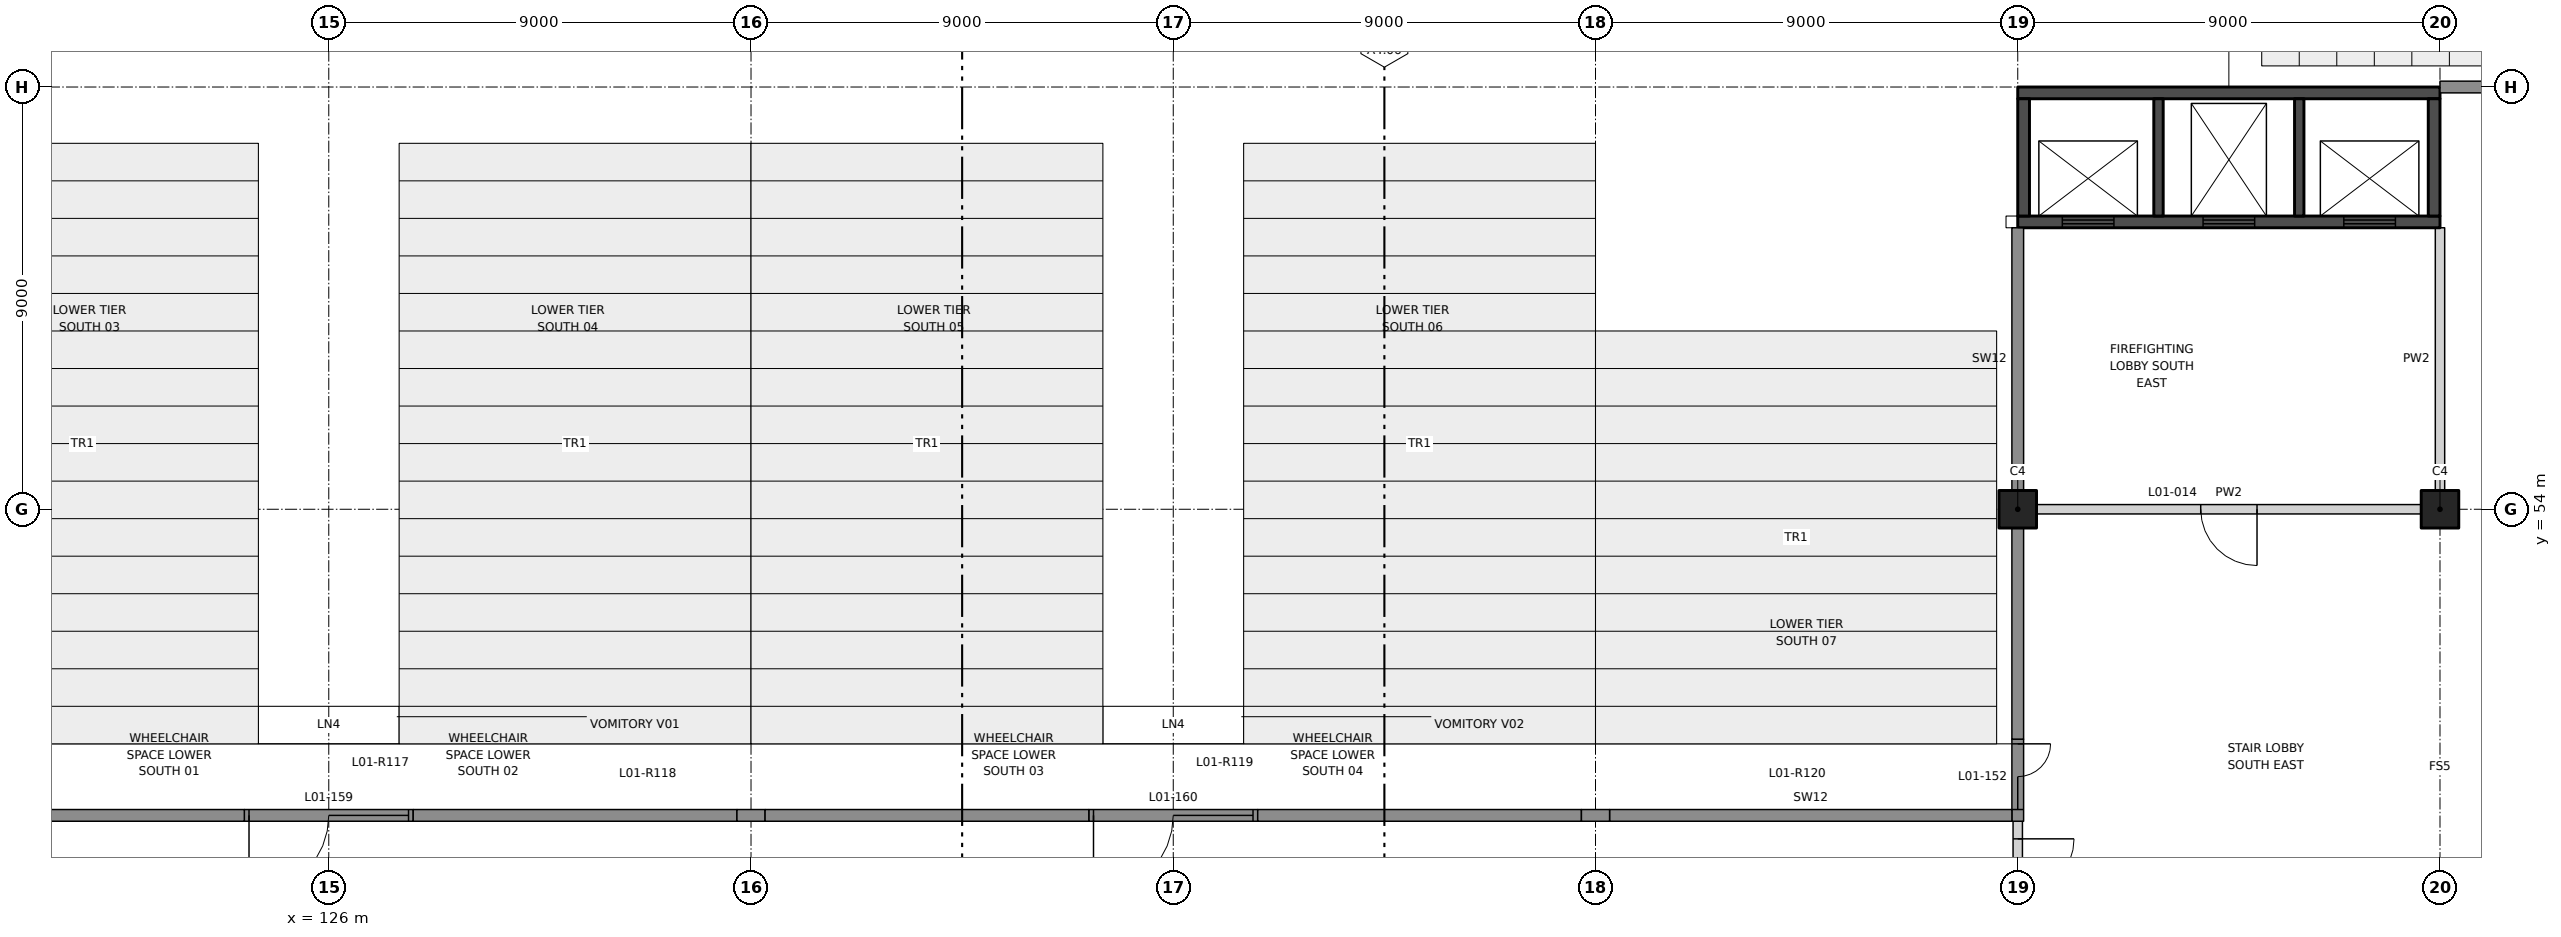
"""IFC4 building model, lengths in metres.
Left out: names, types, materials, properties, quantities, classifications, styles, units other than length and angle.
Written with IfcOpenShell. Run it as: python <this file> out.ifc"""

import sys

from ifc_helpers import new_model, si_unit, direction, frame, frame_2d, origin, origin_2d, place, context, subcontext, project, spatial, rectangle, extrude, element, fill, save


model = new_model("IFC4")
c1 = context("Model", 3, precision=1e-05, world=origin(), true_north=direction((0.0, 1.0)))
c2 = subcontext(c1, "Body", "Model", "MODEL_VIEW")
j1 = project(units=[si_unit("LENGTHUNIT", "METRE"), si_unit("PLANEANGLEUNIT", "RADIAN")], contexts=[c1])
p1 = place(None, origin())
s1 = spatial("IfcSite", under=j1, at=p1, CompositionType="ELEMENT")
p2 = place(p1, origin())
s2 = spatial("IfcBuilding", under=s1, at=p2, CompositionType="ELEMENT")
p3 = place(p2, frame((0.0, 0.0, 7.0)))
s3 = spatial("IfcBuildingStorey", under=s2, at=p3, CompositionType="ELEMENT", Elevation=7.0)
for number, where, z_axis, x_axis in (
    (1, (162.0, 54.0, 0.0), (0.0, 0.0, 1.0), (1.0, 0.0, 0.0)),
    (2, (171.0, 54.0, 0.0), (0.0, 0.0, 1.0), (1.0, 0.0, 0.0)),
):
    element("IfcColumn", number, at=place(p3, frame(where, z_axis=z_axis, x_axis=x_axis)), inside=s3, PredefinedType="COLUMN", context=c2, shape_type="SweptSolid", body=[
        extrude(rectangle(XDim=0.8, YDim=0.8, at=origin_2d()), origin(), (0.0, 0.0, 1.0), 4.5),
    ])
p4 = place(p3, frame((162.4, 54.0, 0.0), z_axis=(0.0, 0.0, 1.0), x_axis=(1.0, 0.0, 0.0)))
e3 = element("IfcWall", 3, at=p4, inside=s3, PredefinedType="PARTITIONING", context=c2, shape_type="SweptSolid", body=[
    extrude(rectangle(XDim=8.2, YDim=0.2, at=frame_2d((4.1, 0.0))), origin(), (0.0, 0.0, 1.0), 3.25),
])
p5 = place(p4, frame((3.5, 0.0, 0.0)))
e4 = element("IfcOpeningElement", 4, at=p5, cuts=e3, PredefinedType="OPENING", context=c2, shape_type="SweptSolid", body=[
    extrude(rectangle(XDim=1.2, YDim=2.1, at=frame_2d((0.6, 1.05))), frame((0.0, 0.11, 0.0), z_axis=(0.0, -1.0, 0.0), x_axis=(1.0, 0.0, 0.0)), (0.0, 0.0, 1.0), 0.22),
])
p6 = place(p3, frame((162.0, 45.4, 0.0), z_axis=(0.0, 0.0, 1.0), x_axis=(0.0, 1.0, 0.0)))
e5 = element("IfcWall", 5, at=p6, inside=s3, PredefinedType="PARTITIONING", context=c2, shape_type="SweptSolid", body=[
    extrude(rectangle(XDim=1.95, YDim=0.2, at=frame_2d((0.975, 0.0))), origin(), (0.0, 0.0, 1.0), 3.15),
])
p7 = place(p6, frame((0.375, 0.0, 0.0)))
e6 = element("IfcOpeningElement", 6, at=p7, cuts=e5, PredefinedType="OPENING", context=c2, shape_type="SweptSolid", body=[
    extrude(rectangle(XDim=1.2, YDim=2.1, at=frame_2d((0.6, 1.05))), frame((0.0, 0.11, 0.0), z_axis=(0.0, -1.0, 0.0), x_axis=(1.0, 0.0, 0.0)), (0.0, 0.0, 1.0), 0.22),
])
p8 = place(p3, frame((171.0, 54.4, 0.0), z_axis=(0.0, 0.0, 1.0), x_axis=(0.0, 1.0, 0.0)))
e7 = element("IfcWall", 7, at=p8, inside=s3, PredefinedType="PARTITIONING", context=c2, shape_type="SweptSolid", body=[
    extrude(rectangle(XDim=5.6, YDim=0.2, at=frame_2d((2.8, 0.0))), origin(), (0.0, 0.0, 1.0), 3.45),
])
p9 = place(p3, frame((162.0, 60.125, 0.0), z_axis=(0.0, 0.0, 1.0), x_axis=(1.0, 0.0, 0.0)))
e8 = element("IfcWall", 8, at=p9, inside=s3, PredefinedType="SHEAR", context=c2, shape_type="SweptSolid", body=[
    extrude(rectangle(XDim=9.0, YDim=0.25, at=frame_2d((4.5, 0.0))), origin(), (0.0, 0.0, 1.0), 4.5),
])
p10 = place(p9, frame((0.95, 0.0, 0.0)))
e9 = element("IfcOpeningElement", 9, at=p10, cuts=e8, PredefinedType="OPENING", context=c2, shape_type="SweptSolid", body=[
    extrude(rectangle(XDim=1.1, YDim=2.1, at=frame_2d((0.55, 1.05))), frame((0.0, 0.135, 0.0), z_axis=(0.0, -1.0, 0.0), x_axis=(1.0, 0.0, 0.0)), (0.0, 0.0, 1.0), 0.27),
])
p11 = place(p9, frame((3.95, 0.0, 0.0)))
e10 = element("IfcOpeningElement", 10, at=p11, cuts=e8, PredefinedType="OPENING", context=c2, shape_type="SweptSolid", body=[
    extrude(rectangle(XDim=1.1, YDim=2.1, at=frame_2d((0.55, 1.05))), frame((0.0, 0.135, 0.0), z_axis=(0.0, -1.0, 0.0), x_axis=(1.0, 0.0, 0.0)), (0.0, 0.0, 1.0), 0.27),
])
p12 = place(p9, frame((6.95, 0.0, 0.0)))
e11 = element("IfcOpeningElement", 11, at=p12, cuts=e8, PredefinedType="OPENING", context=c2, shape_type="SweptSolid", body=[
    extrude(rectangle(XDim=1.1, YDim=2.1, at=frame_2d((0.55, 1.05))), frame((0.0, 0.135, 0.0), z_axis=(0.0, -1.0, 0.0), x_axis=(1.0, 0.0, 0.0)), (0.0, 0.0, 1.0), 0.27),
])
p13 = place(p3, frame((162.0, 62.875, 0.0), z_axis=(0.0, 0.0, 1.0), x_axis=(1.0, 0.0, 0.0)))
e12 = element("IfcWall", 12, at=p13, inside=s3, PredefinedType="SHEAR", context=c2, shape_type="SweptSolid", body=[
    extrude(rectangle(XDim=9.0, YDim=0.25, at=frame_2d((4.5, 0.0))), origin(), (0.0, 0.0, 1.0), 4.5),
])
for number, where, z_axis, x_axis in (
    (13, (162.125, 60.25, 0.0), (0.0, 0.0, 1.0), (0.0, 1.0, 0.0)),
    (14, (170.875, 60.25, 0.0), (0.0, 0.0, 1.0), (0.0, 1.0, 0.0)),
):
    element("IfcWall", number, at=place(p3, frame(where, z_axis=z_axis, x_axis=x_axis)), inside=s3, PredefinedType="SHEAR", context=c2, shape_type="SweptSolid", body=[
        extrude(rectangle(XDim=2.5, YDim=0.25, at=frame_2d((1.25, 0.0))), origin(), (0.0, 0.0, 1.0), 4.5),
    ])
for number, where, z_axis, x_axis in (
    (15, (165.0, 60.25, 0.0), (0.0, 0.0, 1.0), (0.0, 1.0, 0.0)),
    (16, (168.0, 60.25, 0.0), (0.0, 0.0, 1.0), (0.0, 1.0, 0.0)),
):
    element("IfcWall", number, at=place(p3, frame(where, z_axis=z_axis, x_axis=x_axis)), inside=s3, PredefinedType="SHEAR", context=c2, shape_type="SweptSolid", body=[
        extrude(rectangle(XDim=2.5, YDim=0.2, at=frame_2d((1.25, 0.0))), origin(), (0.0, 0.0, 1.0), 4.5),
    ])
p14 = place(p3, frame((162.0, 49.1, 0.0), z_axis=(0.0, 0.0, 1.0), x_axis=(0.0, -1.0, 0.0)))
e17 = element("IfcWall", 17, at=p14, inside=s3, PredefinedType="SOLIDWALL", context=c2, shape_type="SweptSolid", body=[
    extrude(rectangle(XDim=1.75, YDim=0.25, at=frame_2d((0.875, 0.0))), origin(), (0.0, 0.0, 1.0), 3.15),
])
p15 = place(p14, frame((0.1, 0.0, 0.0)))
e18 = element("IfcOpeningElement", 18, at=p15, cuts=e17, PredefinedType="OPENING", context=c2, shape_type="SweptSolid", body=[
    extrude(rectangle(XDim=1.4, YDim=2.4, at=frame_2d((0.7, 1.2))), frame((0.0, 0.135, 0.0), z_axis=(0.0, -1.0, 0.0), x_axis=(1.0, 0.0, 0.0)), (0.0, 0.0, 1.0), 0.27),
])
p16 = place(p3, frame((162.0, 49.1, 0.0), z_axis=(0.0, 0.0, 1.0), x_axis=(0.0, 1.0, 0.0)))
e19 = element("IfcWall", 19, at=p16, inside=s3, PredefinedType="SOLIDWALL", context=c2, shape_type="SweptSolid", body=[
    extrude(rectangle(XDim=4.5, YDim=0.25, at=frame_2d((2.25, 0.0))), origin(), (0.0, 0.0, 1.0), 3.15),
])
p17 = place(p3, frame((162.0, 54.4, 0.0), z_axis=(0.0, 0.0, 1.0), x_axis=(0.0, 1.0, 0.0)))
e20 = element("IfcWall", 20, at=p17, inside=s3, PredefinedType="SOLIDWALL", context=c2, shape_type="SweptSolid", body=[
    extrude(rectangle(XDim=5.6, YDim=0.25, at=frame_2d((2.8, 0.0))), origin(), (0.0, 0.0, 1.0), 3.45),
])
p18 = place(p3, frame((171.0, 63.0, 0.0), z_axis=(0.0, 0.0, 1.0), x_axis=(1.0, 0.0, 0.0)))
e21 = element("IfcWall", 21, at=p18, inside=s3, PredefinedType="SOLIDWALL", context=c2, shape_type="SweptSolid", body=[
    extrude(rectangle(XDim=4.9, YDim=0.25, at=frame_2d((2.45, 0.0))), origin(), (0.0, 0.0, 1.0), 3.15),
])
p19 = place(p3, frame((124.2, 47.475, 0.0), z_axis=(0.0, 0.0, 1.0), x_axis=(1.0, 0.0, 0.0)))
e22 = element("IfcWall", 22, at=p19, inside=s3, PredefinedType="SOLIDWALL", context=c2, shape_type="SweptSolid", body=[
    extrude(rectangle(XDim=3.6, YDim=0.25, at=frame_2d((1.8, 0.0))), origin(), (0.0, 0.0, 1.0), 3.15),
])
p20 = place(p19, frame((0.1, 0.0, 0.0)))
e23 = element("IfcOpeningElement", 23, at=p20, cuts=e22, PredefinedType="OPENING", context=c2, shape_type="SweptSolid", body=[
    extrude(rectangle(XDim=3.4, YDim=2.4, at=frame_2d((1.7, 1.2))), frame((0.0, 0.135, 0.0), z_axis=(0.0, -1.0, 0.0), x_axis=(1.0, 0.0, 0.0)), (0.0, 0.0, 1.0), 0.27),
])
p21 = place(p3, frame((142.2, 47.475, 0.0), z_axis=(0.0, 0.0, 1.0), x_axis=(1.0, 0.0, 0.0)))
e24 = element("IfcWall", 24, at=p21, inside=s3, PredefinedType="SOLIDWALL", context=c2, shape_type="SweptSolid", body=[
    extrude(rectangle(XDim=3.6, YDim=0.25, at=frame_2d((1.8, 0.0))), origin(), (0.0, 0.0, 1.0), 3.15),
])
p22 = place(p21, frame((0.1, 0.0, 0.0)))
e25 = element("IfcOpeningElement", 25, at=p22, cuts=e24, PredefinedType="OPENING", context=c2, shape_type="SweptSolid", body=[
    extrude(rectangle(XDim=3.4, YDim=2.4, at=frame_2d((1.7, 1.2))), frame((0.0, 0.135, 0.0), z_axis=(0.0, -1.0, 0.0), x_axis=(1.0, 0.0, 0.0)), (0.0, 0.0, 1.0), 0.27),
])
for number, where, z_axis, x_axis in (
    (26, (117.3, 47.475, 0.0), (0.0, 0.0, 1.0), (1.0, 0.0, 0.0)),
    (27, (127.8, 47.475, 0.0), (0.0, 0.0, 1.0), (1.0, 0.0, 0.0)),
):
    element("IfcWall", number, at=place(p3, frame(where, z_axis=z_axis, x_axis=x_axis)), inside=s3, PredefinedType="SOLIDWALL", context=c2, shape_type="SweptSolid", body=[
        extrude(rectangle(XDim=6.9, YDim=0.25, at=frame_2d((3.45, 0.0))), origin(), (0.0, 0.0, 1.0), 3.15),
    ])
p23 = place(p3, frame((153.3, 47.475, 0.0), z_axis=(0.0, 0.0, 1.0), x_axis=(1.0, 0.0, 0.0)))
e28 = element("IfcWall", 28, at=p23, inside=s3, PredefinedType="SOLIDWALL", context=c2, shape_type="SweptSolid", body=[
    extrude(rectangle(XDim=8.575, YDim=0.25, at=frame_2d((4.288, 0.0))), origin(), (0.0, 0.0, 1.0), 3.15),
])
p24 = place(p3, frame((134.7, 47.475, 0.0), z_axis=(0.0, 0.0, 1.0), x_axis=(1.0, 0.0, 0.0)))
e29 = element("IfcWall", 29, at=p24, inside=s3, PredefinedType="SOLIDWALL", context=c2, shape_type="SweptSolid", body=[
    extrude(rectangle(XDim=0.6, YDim=0.25, at=frame_2d((0.3, 0.0))), origin(), (0.0, 0.0, 1.0), 4.15),
])
for number, where, z_axis, x_axis in (
    (30, (135.3, 47.475, 0.0), (0.0, 0.0, 1.0), (1.0, 0.0, 0.0)),
    (31, (145.8, 47.475, 0.0), (0.0, 0.0, 1.0), (1.0, 0.0, 0.0)),
):
    element("IfcWall", number, at=place(p3, frame(where, z_axis=z_axis, x_axis=x_axis)), inside=s3, PredefinedType="SOLIDWALL", context=c2, shape_type="SweptSolid", body=[
        extrude(rectangle(XDim=6.9, YDim=0.25, at=frame_2d((3.45, 0.0))), origin(), (0.0, 0.0, 1.0), 3.15),
    ])
p25 = place(p3, frame((152.7, 47.475, 0.0), z_axis=(0.0, 0.0, 1.0), x_axis=(1.0, 0.0, 0.0)))
e32 = element("IfcWall", 32, at=p25, inside=s3, PredefinedType="SOLIDWALL", context=c2, shape_type="SweptSolid", body=[
    extrude(rectangle(XDim=0.6, YDim=0.25, at=frame_2d((0.3, 0.0))), origin(), (0.0, 0.0, 1.0), 4.15),
])
p26 = place(p5, frame((1.2, 0.0, 0.0), z_axis=(0.0, 0.0, 1.0), x_axis=(-1.0, 0.0, 0.0)))
e33 = element("IfcDoor", 33, at=p26, inside=s3, OperationType="SINGLE_SWING_LEFT", PredefinedType="DOOR", context=c2, shape_type="SweptSolid", body=[
    extrude(rectangle(XDim=1.2, YDim=2.1, at=frame_2d((0.6, 1.05))), frame((0.0, 0.025, 0.0), z_axis=(0.0, -1.0, 0.0), x_axis=(1.0, 0.0, 0.0)), (0.0, 0.0, 1.0), 0.05),
])
fill(e4, e33)
p27 = place(p7, frame((1.2, 0.0, 0.0), z_axis=(0.0, 0.0, 1.0), x_axis=(-1.0, 0.0, 0.0)))
e34 = element("IfcDoor", 34, at=p27, inside=s3, OperationType="SINGLE_SWING_LEFT", PredefinedType="DOOR", context=c2, shape_type="SweptSolid", body=[
    extrude(rectangle(XDim=1.2, YDim=2.1, at=frame_2d((0.6, 1.05))), frame((0.0, 0.025, 0.0), z_axis=(0.0, -1.0, 0.0), x_axis=(1.0, 0.0, 0.0)), (0.0, 0.0, 1.0), 0.05),
])
fill(e6, e34)
p28 = place(p10, origin())
e35 = element("IfcDoor", 35, at=p28, inside=s3, OperationType="DOUBLE_DOOR_SLIDING", PredefinedType="DOOR", context=c2, shape_type="SweptSolid", body=[
    extrude(rectangle(XDim=1.1, YDim=2.1, at=frame_2d((0.55, 1.05))), frame((0.0, 0.025, 0.0), z_axis=(0.0, -1.0, 0.0), x_axis=(1.0, 0.0, 0.0)), (0.0, 0.0, 1.0), 0.05),
])
fill(e9, e35)
p29 = place(p11, origin())
e36 = element("IfcDoor", 36, at=p29, inside=s3, OperationType="DOUBLE_DOOR_SLIDING", PredefinedType="DOOR", context=c2, shape_type="SweptSolid", body=[
    extrude(rectangle(XDim=1.1, YDim=2.1, at=frame_2d((0.55, 1.05))), frame((0.0, 0.025, 0.0), z_axis=(0.0, -1.0, 0.0), x_axis=(1.0, 0.0, 0.0)), (0.0, 0.0, 1.0), 0.05),
])
fill(e10, e36)
p30 = place(p12, origin())
e37 = element("IfcDoor", 37, at=p30, inside=s3, OperationType="DOUBLE_DOOR_SLIDING", PredefinedType="DOOR", context=c2, shape_type="SweptSolid", body=[
    extrude(rectangle(XDim=1.1, YDim=2.1, at=frame_2d((0.55, 1.05))), frame((0.0, 0.025, 0.0), z_axis=(0.0, -1.0, 0.0), x_axis=(1.0, 0.0, 0.0)), (0.0, 0.0, 1.0), 0.05),
])
fill(e11, e37)
p31 = place(p15, origin())
e38 = element("IfcDoor", 38, at=p31, inside=s3, OperationType="DOUBLE_DOOR_SINGLE_SWING", PredefinedType="DOOR", context=c2, shape_type="SweptSolid", body=[
    extrude(rectangle(XDim=1.4, YDim=2.4, at=frame_2d((0.7, 1.2))), frame((0.0, 0.025, 0.0), z_axis=(0.0, -1.0, 0.0), x_axis=(1.0, 0.0, 0.0)), (0.0, 0.0, 1.0), 0.05),
])
fill(e18, e38)
p32 = place(p20, frame((3.4, 0.0, 0.0), z_axis=(0.0, 0.0, 1.0), x_axis=(-1.0, 0.0, 0.0)))
e39 = element("IfcDoor", 39, at=p32, inside=s3, OperationType="DOUBLE_DOOR_SINGLE_SWING", PredefinedType="DOOR", context=c2, shape_type="SweptSolid", body=[
    extrude(rectangle(XDim=3.4, YDim=2.4, at=frame_2d((1.7, 1.2))), frame((0.0, 0.025, 0.0), z_axis=(0.0, -1.0, 0.0), x_axis=(1.0, 0.0, 0.0)), (0.0, 0.0, 1.0), 0.05),
])
fill(e23, e39)
p33 = place(p22, frame((3.4, 0.0, 0.0), z_axis=(0.0, 0.0, 1.0), x_axis=(-1.0, 0.0, 0.0)))
e40 = element("IfcDoor", 40, at=p33, inside=s3, OperationType="DOUBLE_DOOR_SINGLE_SWING", PredefinedType="DOOR", context=c2, shape_type="SweptSolid", body=[
    extrude(rectangle(XDim=3.4, YDim=2.4, at=frame_2d((1.7, 1.2))), frame((0.0, 0.025, 0.0), z_axis=(0.0, -1.0, 0.0), x_axis=(1.0, 0.0, 0.0)), (0.0, 0.0, 1.0), 0.05),
])
fill(e25, e40)
save(model, sys.argv[1])
